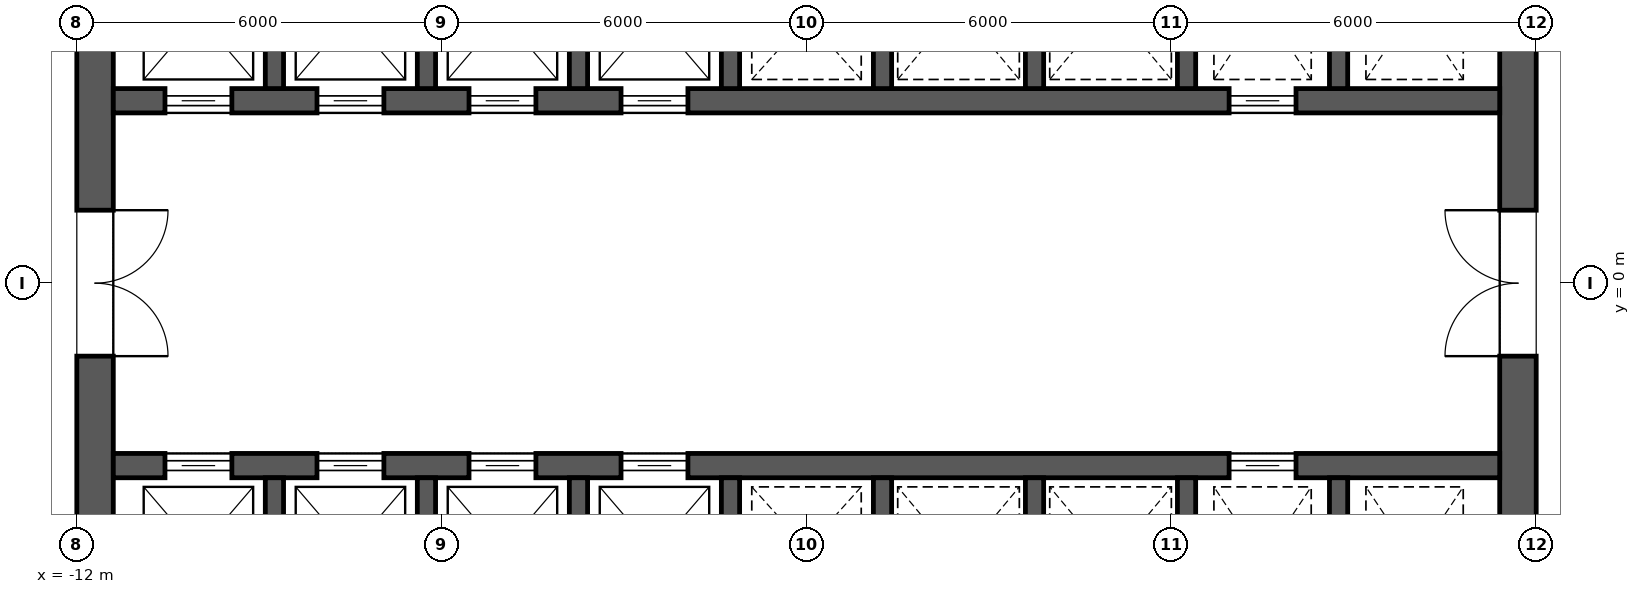
"""IFC4 building model, lengths in metres.
Left out: names, types, materials, properties, quantities, classifications, styles, units other than length and angle.
Written with IfcOpenShell. Run it as: python <this file> out.ifc"""

import sys

from ifc_helpers import new_model, si_unit, direction, frame, frame_2d, origin, place, context, subcontext, project, spatial, rectangle, extrude, element, fill, save


model = new_model("IFC4")
c1 = context("Model", 3, precision=1e-05, world=origin(), true_north=direction((0.0, 1.0)))
c2 = subcontext(c1, "Body", "Model", "MODEL_VIEW")
j1 = project(units=[si_unit("LENGTHUNIT", "METRE"), si_unit("PLANEANGLEUNIT", "RADIAN")], contexts=[c1])
p1 = place(None, origin())
s1 = spatial("IfcSite", under=j1, at=p1, CompositionType="ELEMENT")
p2 = place(p1, origin())
s2 = spatial("IfcBuilding", under=s1, at=p2, CompositionType="ELEMENT")
p3 = place(p2, frame((0.0, 0.0, 31.9)))
s3 = spatial("IfcBuildingStorey", under=s2, at=p3, CompositionType="ELEMENT", Elevation=31.9)
p4 = place(p3, frame((11.7, -11.4, 0.0), z_axis=(0.0, 0.0, 1.0), x_axis=(0.0, 1.0, 0.0)))
e1 = element("IfcWall", 1, at=p4, inside=s3, PredefinedType="SHEAR", context=c2, shape_type="SweptSolid", body=[
    extrude(rectangle(XDim=22.8, YDim=0.6, at=frame_2d((11.4, 0.0))), origin(), (0.0, 0.0, 1.0), 4.2),
])
p5 = place(p4, frame((10.2, 0.0, 0.0)))
e2 = element("IfcOpeningElement", 2, at=p5, cuts=e1, PredefinedType="OPENING", context=c2, shape_type="SweptSolid", body=[
    extrude(rectangle(XDim=2.4, YDim=2.1, at=frame_2d((1.2, 1.05))), frame((0.0, 0.312, 0.0), z_axis=(0.0, -1.0, 0.0), x_axis=(1.0, 0.0, 0.0)), (0.0, 0.0, 1.0), 0.624),
])
p6 = place(p4, frame((19.5, 0.0, 0.0)))
e3 = element("IfcOpeningElement", 3, at=p6, cuts=e1, PredefinedType="OPENING", context=c2, shape_type="SweptSolid", body=[
    extrude(rectangle(XDim=1.2, YDim=2.1, at=frame_2d((0.6, 1.05))), frame((0.0, 0.312, 0.0), z_axis=(0.0, -1.0, 0.0), x_axis=(1.0, 0.0, 0.0)), (0.0, 0.0, 1.0), 0.624),
])
p7 = place(p4, frame((2.1, 0.0, 0.0)))
e4 = element("IfcOpeningElement", 4, at=p7, cuts=e1, PredefinedType="OPENING", context=c2, shape_type="SweptSolid", body=[
    extrude(rectangle(XDim=1.2, YDim=2.1, at=frame_2d((0.6, 1.05))), frame((0.0, 0.312, 0.0), z_axis=(0.0, -1.0, 0.0), x_axis=(1.0, 0.0, 0.0)), (0.0, 0.0, 1.0), 0.624),
])
p8 = place(p3, frame((-11.7, -11.4, 0.0), z_axis=(0.0, 0.0, 1.0), x_axis=(0.0, 1.0, 0.0)))
e5 = element("IfcWall", 5, at=p8, inside=s3, PredefinedType="SHEAR", context=c2, shape_type="SweptSolid", body=[
    extrude(rectangle(XDim=22.8, YDim=0.6, at=frame_2d((11.4, 0.0))), origin(), (0.0, 0.0, 1.0), 4.2),
])
p9 = place(p8, frame((10.2, 0.0, 0.0)))
e6 = element("IfcOpeningElement", 6, at=p9, cuts=e5, PredefinedType="OPENING", context=c2, shape_type="SweptSolid", body=[
    extrude(rectangle(XDim=2.4, YDim=2.1, at=frame_2d((1.2, 1.05))), frame((0.0, 0.312, 0.0), z_axis=(0.0, -1.0, 0.0), x_axis=(1.0, 0.0, 0.0)), (0.0, 0.0, 1.0), 0.624),
])
p10 = place(p8, frame((18.925, 0.0, 0.0)))
e7 = element("IfcOpeningElement", 7, at=p10, cuts=e5, PredefinedType="OPENING", context=c2, shape_type="SweptSolid", body=[
    extrude(rectangle(XDim=1.2, YDim=2.1, at=frame_2d((0.6, 1.05))), frame((0.0, 0.312, 0.0), z_axis=(0.0, -1.0, 0.0), x_axis=(1.0, 0.0, 0.0)), (0.0, 0.0, 1.0), 0.624),
])
p11 = place(p8, frame((2.675, 0.0, 0.0)))
e8 = element("IfcOpeningElement", 8, at=p11, cuts=e5, PredefinedType="OPENING", context=c2, shape_type="SweptSolid", body=[
    extrude(rectangle(XDim=1.2, YDim=2.1, at=frame_2d((0.6, 1.05))), frame((0.0, 0.312, 0.0), z_axis=(0.0, -1.0, 0.0), x_axis=(1.0, 0.0, 0.0)), (0.0, 0.0, 1.0), 0.624),
])
p12 = place(p3, frame((-11.4, 3.0, 0.0), z_axis=(0.0, 0.0, 1.0), x_axis=(1.0, 0.0, 0.0)))
e9 = element("IfcWall", 9, at=p12, inside=s3, PredefinedType="SHEAR", context=c2, shape_type="SweptSolid", body=[
    extrude(rectangle(XDim=22.8, YDim=0.4, at=frame_2d((11.4, 0.0))), origin(), (0.0, 0.0, 1.0), 4.2),
])
p13 = place(p12, frame((0.85, 0.0, 0.0)))
e10 = element("IfcOpeningElement", 10, at=p13, cuts=e9, PredefinedType="OPENING", context=c2, shape_type="SweptSolid", body=[
    extrude(rectangle(XDim=1.1, YDim=2.1, at=frame_2d((0.55, 1.05))), frame((0.0, 0.212, 0.0), z_axis=(0.0, -1.0, 0.0), x_axis=(1.0, 0.0, 0.0)), (0.0, 0.0, 1.0), 0.424),
])
p14 = place(p12, frame((3.35, 0.0, 0.0)))
e11 = element("IfcOpeningElement", 11, at=p14, cuts=e9, PredefinedType="OPENING", context=c2, shape_type="SweptSolid", body=[
    extrude(rectangle(XDim=1.1, YDim=2.1, at=frame_2d((0.55, 1.05))), frame((0.0, 0.212, 0.0), z_axis=(0.0, -1.0, 0.0), x_axis=(1.0, 0.0, 0.0)), (0.0, 0.0, 1.0), 0.424),
])
p15 = place(p12, frame((5.85, 0.0, 0.0)))
e12 = element("IfcOpeningElement", 12, at=p15, cuts=e9, PredefinedType="OPENING", context=c2, shape_type="SweptSolid", body=[
    extrude(rectangle(XDim=1.1, YDim=2.1, at=frame_2d((0.55, 1.05))), frame((0.0, 0.212, 0.0), z_axis=(0.0, -1.0, 0.0), x_axis=(1.0, 0.0, 0.0)), (0.0, 0.0, 1.0), 0.424),
])
p16 = place(p12, frame((8.35, 0.0, 0.0)))
e13 = element("IfcOpeningElement", 13, at=p16, cuts=e9, PredefinedType="OPENING", context=c2, shape_type="SweptSolid", body=[
    extrude(rectangle(XDim=1.1, YDim=2.1, at=frame_2d((0.55, 1.05))), frame((0.0, 0.212, 0.0), z_axis=(0.0, -1.0, 0.0), x_axis=(1.0, 0.0, 0.0)), (0.0, 0.0, 1.0), 0.424),
])
p17 = place(p12, frame((18.35, 0.0, 0.0)))
e14 = element("IfcOpeningElement", 14, at=p17, cuts=e9, PredefinedType="OPENING", context=c2, shape_type="SweptSolid", body=[
    extrude(rectangle(XDim=1.1, YDim=2.1, at=frame_2d((0.55, 1.05))), frame((0.0, 0.212, 0.0), z_axis=(0.0, -1.0, 0.0), x_axis=(1.0, 0.0, 0.0)), (0.0, 0.0, 1.0), 0.424),
])
for number, where, z_axis, x_axis in (
    (15, (-8.75, 3.2, 0.0), (0.0, 0.0, 1.0), (0.0, 1.0, 0.0)),
    (16, (-6.25, 3.2, 0.0), (0.0, 0.0, 1.0), (0.0, 1.0, 0.0)),
    (17, (-3.75, 3.2, 0.0), (0.0, 0.0, 1.0), (0.0, 1.0, 0.0)),
    (18, (-1.25, 3.2, 0.0), (0.0, 0.0, 1.0), (0.0, 1.0, 0.0)),
    (19, (1.25, 3.2, 0.0), (0.0, 0.0, 1.0), (0.0, 1.0, 0.0)),
    (20, (3.75, 3.2, 0.0), (0.0, 0.0, 1.0), (0.0, 1.0, 0.0)),
    (21, (6.25, 3.2, 0.0), (0.0, 0.0, 1.0), (0.0, 1.0, 0.0)),
    (22, (8.75, 3.2, 0.0), (0.0, 0.0, 1.0), (0.0, 1.0, 0.0)),
):
    element("IfcWall", number, at=place(p3, frame(where, z_axis=z_axis, x_axis=x_axis)), inside=s3, PredefinedType="SHEAR", context=c2, shape_type="SweptSolid", body=[
        extrude(rectangle(XDim=2.9, YDim=0.3, at=frame_2d((1.45, 0.0))), origin(), (0.0, 0.0, 1.0), 4.2),
    ])
p18 = place(p3, frame((-11.4, -3.0, 0.0), z_axis=(0.0, 0.0, 1.0), x_axis=(1.0, 0.0, 0.0)))
e23 = element("IfcWall", 23, at=p18, inside=s3, PredefinedType="SHEAR", context=c2, shape_type="SweptSolid", body=[
    extrude(rectangle(XDim=22.8, YDim=0.4, at=frame_2d((11.4, 0.0))), origin(), (0.0, 0.0, 1.0), 4.2),
])
p19 = place(p18, frame((0.85, 0.0, 0.0)))
e24 = element("IfcOpeningElement", 24, at=p19, cuts=e23, PredefinedType="OPENING", context=c2, shape_type="SweptSolid", body=[
    extrude(rectangle(XDim=1.1, YDim=2.1, at=frame_2d((0.55, 1.05))), frame((0.0, 0.212, 0.0), z_axis=(0.0, -1.0, 0.0), x_axis=(1.0, 0.0, 0.0)), (0.0, 0.0, 1.0), 0.424),
])
p20 = place(p18, frame((3.35, 0.0, 0.0)))
e25 = element("IfcOpeningElement", 25, at=p20, cuts=e23, PredefinedType="OPENING", context=c2, shape_type="SweptSolid", body=[
    extrude(rectangle(XDim=1.1, YDim=2.1, at=frame_2d((0.55, 1.05))), frame((0.0, 0.212, 0.0), z_axis=(0.0, -1.0, 0.0), x_axis=(1.0, 0.0, 0.0)), (0.0, 0.0, 1.0), 0.424),
])
p21 = place(p18, frame((5.85, 0.0, 0.0)))
e26 = element("IfcOpeningElement", 26, at=p21, cuts=e23, PredefinedType="OPENING", context=c2, shape_type="SweptSolid", body=[
    extrude(rectangle(XDim=1.1, YDim=2.1, at=frame_2d((0.55, 1.05))), frame((0.0, 0.212, 0.0), z_axis=(0.0, -1.0, 0.0), x_axis=(1.0, 0.0, 0.0)), (0.0, 0.0, 1.0), 0.424),
])
p22 = place(p18, frame((8.35, 0.0, 0.0)))
e27 = element("IfcOpeningElement", 27, at=p22, cuts=e23, PredefinedType="OPENING", context=c2, shape_type="SweptSolid", body=[
    extrude(rectangle(XDim=1.1, YDim=2.1, at=frame_2d((0.55, 1.05))), frame((0.0, 0.212, 0.0), z_axis=(0.0, -1.0, 0.0), x_axis=(1.0, 0.0, 0.0)), (0.0, 0.0, 1.0), 0.424),
])
p23 = place(p18, frame((18.35, 0.0, 0.0)))
e28 = element("IfcOpeningElement", 28, at=p23, cuts=e23, PredefinedType="OPENING", context=c2, shape_type="SweptSolid", body=[
    extrude(rectangle(XDim=1.1, YDim=2.1, at=frame_2d((0.55, 1.05))), frame((0.0, 0.212, 0.0), z_axis=(0.0, -1.0, 0.0), x_axis=(1.0, 0.0, 0.0)), (0.0, 0.0, 1.0), 0.424),
])
for number, where, z_axis, x_axis in (
    (29, (-8.75, -6.1, 0.0), (0.0, 0.0, 1.0), (0.0, 1.0, 0.0)),
    (30, (-6.25, -6.1, 0.0), (0.0, 0.0, 1.0), (0.0, 1.0, 0.0)),
    (31, (-3.75, -6.1, 0.0), (0.0, 0.0, 1.0), (0.0, 1.0, 0.0)),
    (32, (-1.25, -6.1, 0.0), (0.0, 0.0, 1.0), (0.0, 1.0, 0.0)),
    (33, (1.25, -6.1, 0.0), (0.0, 0.0, 1.0), (0.0, 1.0, 0.0)),
    (34, (3.75, -6.1, 0.0), (0.0, 0.0, 1.0), (0.0, 1.0, 0.0)),
    (35, (6.25, -6.1, 0.0), (0.0, 0.0, 1.0), (0.0, 1.0, 0.0)),
    (36, (8.75, -6.1, 0.0), (0.0, 0.0, 1.0), (0.0, 1.0, 0.0)),
):
    element("IfcWall", number, at=place(p3, frame(where, z_axis=z_axis, x_axis=x_axis)), inside=s3, PredefinedType="SHEAR", context=c2, shape_type="SweptSolid", body=[
        extrude(rectangle(XDim=2.9, YDim=0.3, at=frame_2d((1.45, 0.0))), origin(), (0.0, 0.0, 1.0), 4.2),
    ])
p24 = place(p13, origin())
e37 = element("IfcDoor", 37, at=p24, inside=s3, OperationType="SLIDING_TO_LEFT", PredefinedType="DOOR", context=c2, shape_type="SweptSolid", body=[
    extrude(rectangle(XDim=1.1, YDim=2.1, at=frame_2d((0.55, 1.05))), frame((0.0, 0.025, 0.0), z_axis=(0.0, -1.0, 0.0), x_axis=(1.0, 0.0, 0.0)), (0.0, 0.0, 1.0), 0.05),
])
fill(e10, e37)
p25 = place(p14, origin())
e38 = element("IfcDoor", 38, at=p25, inside=s3, OperationType="SLIDING_TO_LEFT", PredefinedType="DOOR", context=c2, shape_type="SweptSolid", body=[
    extrude(rectangle(XDim=1.1, YDim=2.1, at=frame_2d((0.55, 1.05))), frame((0.0, 0.025, 0.0), z_axis=(0.0, -1.0, 0.0), x_axis=(1.0, 0.0, 0.0)), (0.0, 0.0, 1.0), 0.05),
])
fill(e11, e38)
p26 = place(p15, origin())
e39 = element("IfcDoor", 39, at=p26, inside=s3, OperationType="SLIDING_TO_LEFT", PredefinedType="DOOR", context=c2, shape_type="SweptSolid", body=[
    extrude(rectangle(XDim=1.1, YDim=2.1, at=frame_2d((0.55, 1.05))), frame((0.0, 0.025, 0.0), z_axis=(0.0, -1.0, 0.0), x_axis=(1.0, 0.0, 0.0)), (0.0, 0.0, 1.0), 0.05),
])
fill(e12, e39)
p27 = place(p16, origin())
e40 = element("IfcDoor", 40, at=p27, inside=s3, OperationType="SLIDING_TO_LEFT", PredefinedType="DOOR", context=c2, shape_type="SweptSolid", body=[
    extrude(rectangle(XDim=1.1, YDim=2.1, at=frame_2d((0.55, 1.05))), frame((0.0, 0.025, 0.0), z_axis=(0.0, -1.0, 0.0), x_axis=(1.0, 0.0, 0.0)), (0.0, 0.0, 1.0), 0.05),
])
fill(e13, e40)
p28 = place(p19, origin())
e41 = element("IfcDoor", 41, at=p28, inside=s3, OperationType="SLIDING_TO_LEFT", PredefinedType="DOOR", context=c2, shape_type="SweptSolid", body=[
    extrude(rectangle(XDim=1.1, YDim=2.1, at=frame_2d((0.55, 1.05))), frame((0.0, 0.025, 0.0), z_axis=(0.0, -1.0, 0.0), x_axis=(1.0, 0.0, 0.0)), (0.0, 0.0, 1.0), 0.05),
])
fill(e24, e41)
p29 = place(p20, origin())
e42 = element("IfcDoor", 42, at=p29, inside=s3, OperationType="SLIDING_TO_LEFT", PredefinedType="DOOR", context=c2, shape_type="SweptSolid", body=[
    extrude(rectangle(XDim=1.1, YDim=2.1, at=frame_2d((0.55, 1.05))), frame((0.0, 0.025, 0.0), z_axis=(0.0, -1.0, 0.0), x_axis=(1.0, 0.0, 0.0)), (0.0, 0.0, 1.0), 0.05),
])
fill(e25, e42)
p30 = place(p21, origin())
e43 = element("IfcDoor", 43, at=p30, inside=s3, OperationType="SLIDING_TO_LEFT", PredefinedType="DOOR", context=c2, shape_type="SweptSolid", body=[
    extrude(rectangle(XDim=1.1, YDim=2.1, at=frame_2d((0.55, 1.05))), frame((0.0, 0.025, 0.0), z_axis=(0.0, -1.0, 0.0), x_axis=(1.0, 0.0, 0.0)), (0.0, 0.0, 1.0), 0.05),
])
fill(e26, e43)
p31 = place(p22, origin())
e44 = element("IfcDoor", 44, at=p31, inside=s3, OperationType="SLIDING_TO_LEFT", PredefinedType="DOOR", context=c2, shape_type="SweptSolid", body=[
    extrude(rectangle(XDim=1.1, YDim=2.1, at=frame_2d((0.55, 1.05))), frame((0.0, 0.025, 0.0), z_axis=(0.0, -1.0, 0.0), x_axis=(1.0, 0.0, 0.0)), (0.0, 0.0, 1.0), 0.05),
])
fill(e27, e44)
p32 = place(p17, origin())
e45 = element("IfcDoor", 45, at=p32, inside=s3, OperationType="SLIDING_TO_LEFT", PredefinedType="DOOR", context=c2, shape_type="SweptSolid", body=[
    extrude(rectangle(XDim=1.1, YDim=2.1, at=frame_2d((0.55, 1.05))), frame((0.0, 0.025, 0.0), z_axis=(0.0, -1.0, 0.0), x_axis=(1.0, 0.0, 0.0)), (0.0, 0.0, 1.0), 0.05),
])
fill(e14, e45)
p33 = place(p23, origin())
e46 = element("IfcDoor", 46, at=p33, inside=s3, OperationType="SLIDING_TO_LEFT", PredefinedType="DOOR", context=c2, shape_type="SweptSolid", body=[
    extrude(rectangle(XDim=1.1, YDim=2.1, at=frame_2d((0.55, 1.05))), frame((0.0, 0.025, 0.0), z_axis=(0.0, -1.0, 0.0), x_axis=(1.0, 0.0, 0.0)), (0.0, 0.0, 1.0), 0.05),
])
fill(e28, e46)
p34 = place(p9, frame((2.4, 0.0, 0.0), z_axis=(0.0, 0.0, 1.0), x_axis=(-1.0, 0.0, 0.0)))
e47 = element("IfcDoor", 47, at=p34, inside=s3, OperationType="DOUBLE_DOOR_SINGLE_SWING", PredefinedType="DOOR", context=c2, shape_type="SweptSolid", body=[
    extrude(rectangle(XDim=2.4, YDim=2.1, at=frame_2d((1.2, 1.05))), frame((0.0, 0.025, 0.0), z_axis=(0.0, -1.0, 0.0), x_axis=(1.0, 0.0, 0.0)), (0.0, 0.0, 1.0), 0.05),
])
fill(e6, e47)
p35 = place(p5, origin())
e48 = element("IfcDoor", 48, at=p35, inside=s3, OperationType="DOUBLE_DOOR_SINGLE_SWING", PredefinedType="DOOR", context=c2, shape_type="SweptSolid", body=[
    extrude(rectangle(XDim=2.4, YDim=2.1, at=frame_2d((1.2, 1.05))), frame((0.0, 0.025, 0.0), z_axis=(0.0, -1.0, 0.0), x_axis=(1.0, 0.0, 0.0)), (0.0, 0.0, 1.0), 0.05),
])
fill(e2, e48)
save(model, sys.argv[1])
